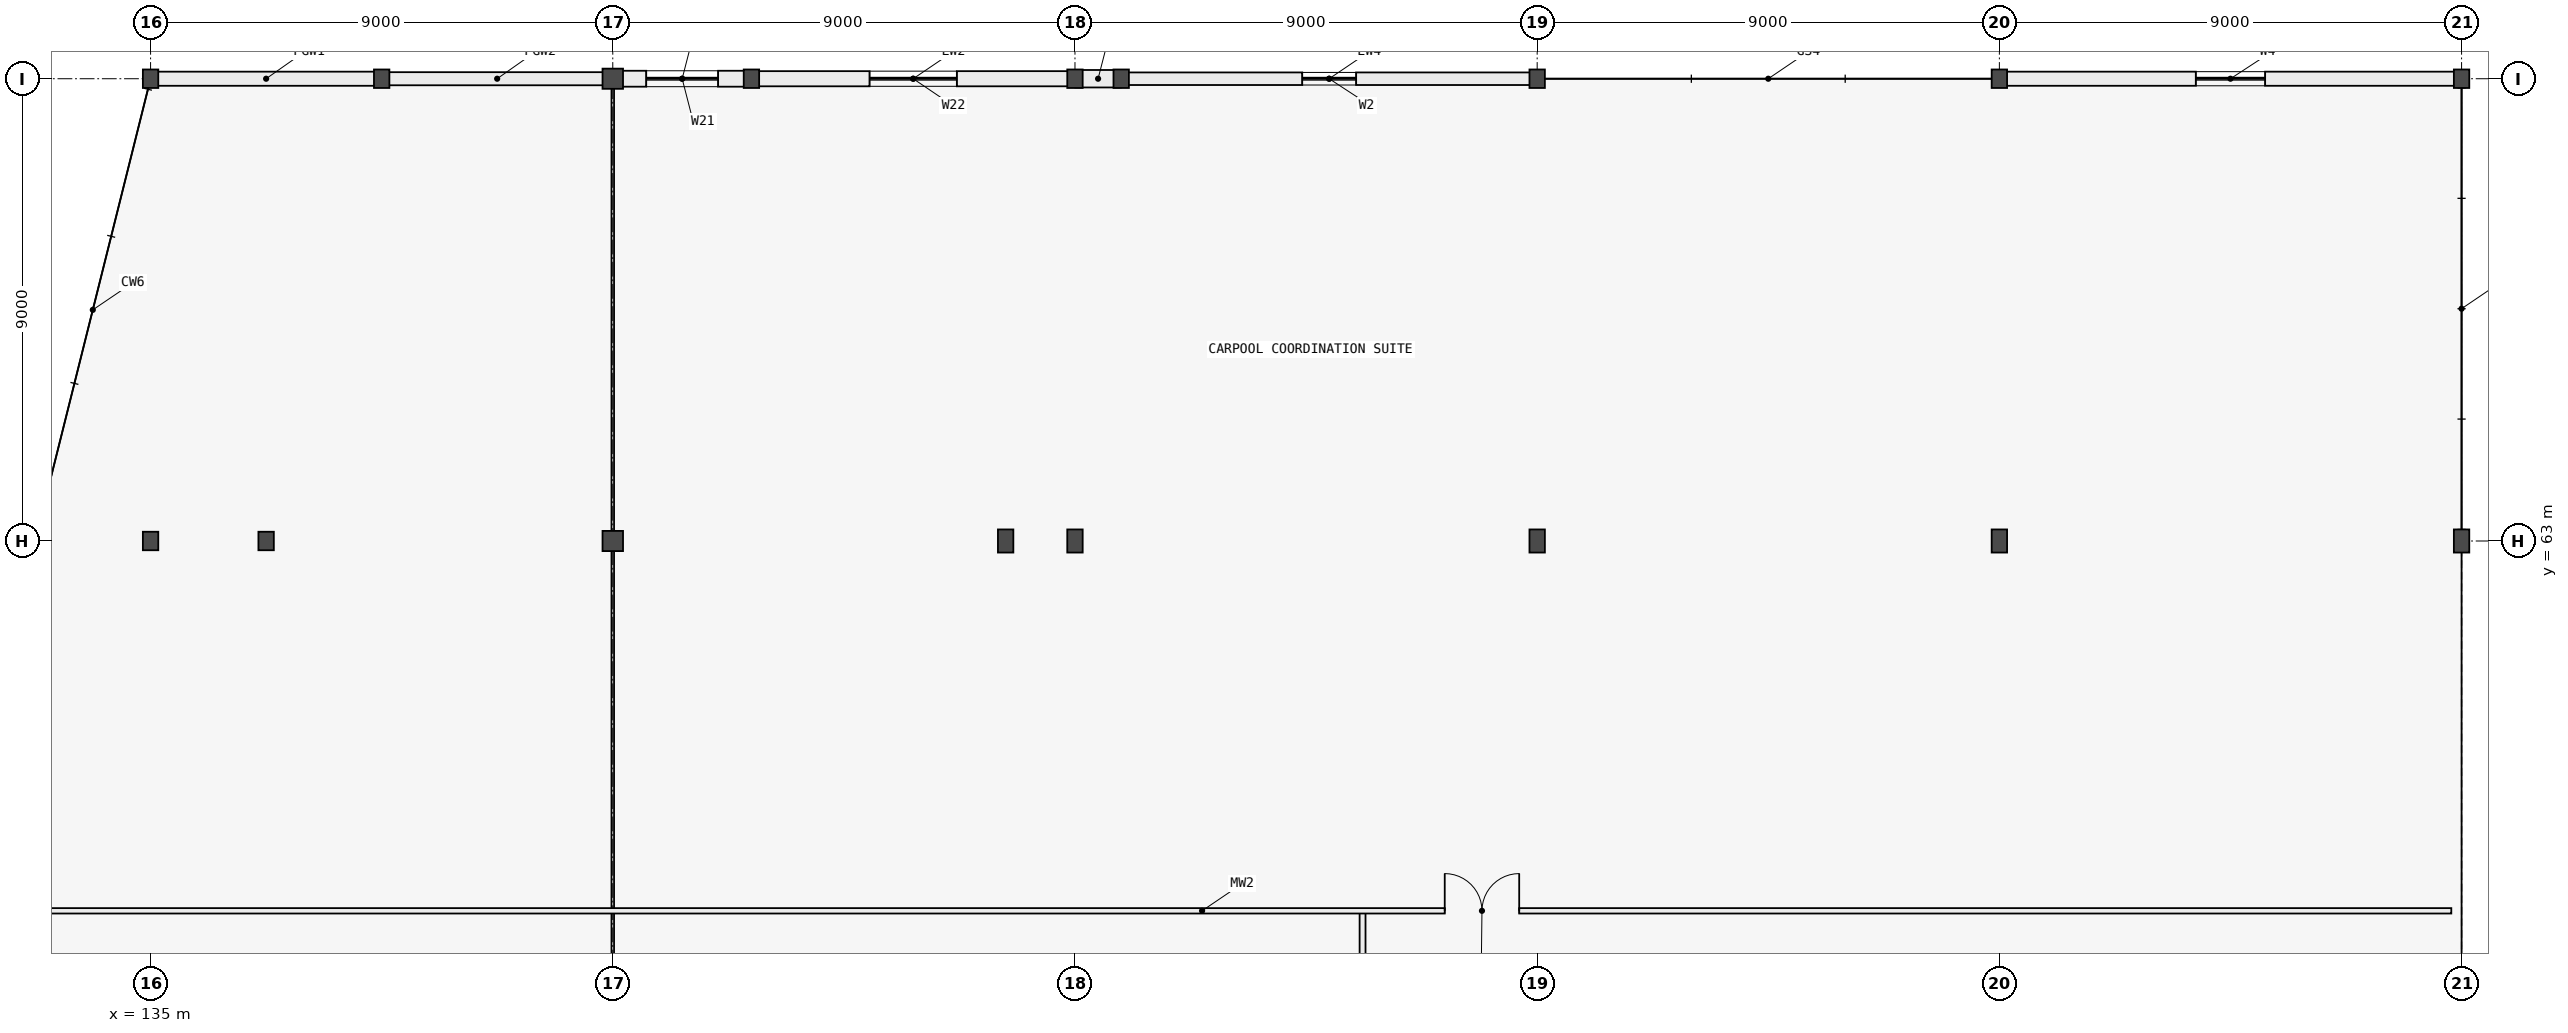
"""IFC4 building model, lengths in metres.
Left out: names, types, materials, properties, quantities, classifications, styles, units other than length and angle.
Written with IfcOpenShell. Run it as: python <this file> out.ifc"""

import sys

from ifc_helpers import new_model, si_unit, direction, frame, frame_2d, origin, origin_2d, place, context, subcontext, project, spatial, rectangle, i_section, extrude, element, fill, save


model = new_model("IFC4")
c1 = context("Model", 3, precision=1e-05, world=origin(), true_north=direction((0.0, 1.0)))
c2 = subcontext(c1, "Body", "Model", "MODEL_VIEW")
j1 = project(units=[si_unit("LENGTHUNIT", "METRE"), si_unit("PLANEANGLEUNIT", "RADIAN")], contexts=[c1])
p1 = place(None, origin())
s1 = spatial("IfcSite", under=j1, at=p1, CompositionType="ELEMENT")
p2 = place(p1, origin())
s2 = spatial("IfcBuilding", under=s1, at=p2, CompositionType="ELEMENT")
p3 = place(p2, frame((0.0, 0.0, 4.2)))
s3 = spatial("IfcBuildingStorey", under=s2, at=p3, CompositionType="ELEMENT", Elevation=4.2)
for number, where, z_axis, x_axis in (
    (1, (135.0, 63.0, 0.0), (0.0, 0.0, 1.0), (1.0, 0.0, 0.0)),
    (2, (137.25, 63.0, 0.0), (0.0, 0.0, 1.0), (1.0, 0.0, 0.0)),
):
    element("IfcColumn", number, at=place(p3, frame(where, z_axis=z_axis, x_axis=x_axis)), inside=s3, PredefinedType="COLUMN", context=c2, shape_type="SweptSolid", body=[
        extrude(i_section(OverallWidth=0.3, OverallDepth=0.36, WebThickness=0.012, FlangeThickness=0.022, FilletRadius=0.027, at=origin_2d()), origin(), (0.0, 0.0, 1.0), 4.2),
    ])
p4 = place(p3, frame((144.0, 63.0, 0.0), z_axis=(0.0, 0.0, 1.0), x_axis=(1.0, 0.0, 0.0)))
e3 = element("IfcColumn", 3, at=p4, inside=s3, PredefinedType="COLUMN", context=c2, shape_type="SweptSolid", body=[
    extrude(i_section(OverallWidth=0.399, OverallDepth=0.393, WebThickness=0.018, FlangeThickness=0.028, FilletRadius=0.015, at=origin_2d()), origin(), (0.0, 0.0, 1.0), 4.2),
])
for number, where, z_axis, x_axis in (
    (4, (151.65, 63.0, 0.0), (0.0, 0.0, 1.0), (1.0, 0.0, 0.0)),
    (5, (153.0, 63.0, 0.0), (0.0, 0.0, 1.0), (1.0, 0.0, 0.0)),
    (6, (162.0, 63.0, 0.0), (0.0, 0.0, 1.0), (1.0, 0.0, 0.0)),
    (7, (171.0, 63.0, 0.0), (0.0, 0.0, 1.0), (1.0, 0.0, 0.0)),
    (8, (180.0, 63.0, 0.0), (0.0, 0.0, 1.0), (1.0, 0.0, 0.0)),
):
    element("IfcColumn", number, at=place(p3, frame(where, z_axis=z_axis, x_axis=x_axis)), inside=s3, PredefinedType="COLUMN", context=c2, shape_type="SweptSolid", body=[
        extrude(i_section(OverallWidth=0.3, OverallDepth=0.45, WebThickness=0.014, FlangeThickness=0.026, FilletRadius=0.027, at=origin_2d()), origin(), (0.0, 0.0, 1.0), 4.2),
    ])
for number, where, z_axis, x_axis in (
    (9, (135.0, 72.0, 0.0), (0.0, 0.0, 1.0), (1.0, 0.0, 0.0)),
    (10, (139.5, 72.0, 0.0), (0.0, 0.0, 1.0), (1.0, 0.0, 0.0)),
):
    element("IfcColumn", number, at=place(p3, frame(where, z_axis=z_axis, x_axis=x_axis)), inside=s3, PredefinedType="COLUMN", context=c2, shape_type="SweptSolid", body=[
        extrude(i_section(OverallWidth=0.3, OverallDepth=0.36, WebThickness=0.012, FlangeThickness=0.022, FilletRadius=0.027, at=origin_2d()), origin(), (0.0, 0.0, 1.0), 4.2),
    ])
p5 = place(p3, frame((144.0, 72.0, 0.0), z_axis=(0.0, 0.0, 1.0), x_axis=(1.0, 0.0, 0.0)))
e11 = element("IfcColumn", 11, at=p5, inside=s3, PredefinedType="COLUMN", context=c2, shape_type="SweptSolid", body=[
    extrude(i_section(OverallWidth=0.399, OverallDepth=0.393, WebThickness=0.018, FlangeThickness=0.028, FilletRadius=0.015, at=origin_2d()), origin(), (0.0, 0.0, 1.0), 4.2),
])
for number, where, z_axis, x_axis in (
    (12, (146.7, 72.0, 0.0), (0.0, 0.0, 1.0), (1.0, 0.0, 0.0)),
    (13, (153.0, 72.0, 0.0), (0.0, 0.0, 1.0), (1.0, 0.0, 0.0)),
    (14, (153.9, 72.0, 0.0), (0.0, 0.0, 1.0), (1.0, 0.0, 0.0)),
    (15, (162.0, 72.0, 0.0), (0.0, 0.0, 1.0), (1.0, 0.0, 0.0)),
    (16, (171.0, 72.0, 0.0), (0.0, 0.0, 1.0), (1.0, 0.0, 0.0)),
    (17, (180.0, 72.0, 0.0), (0.0, 0.0, 1.0), (1.0, 0.0, 0.0)),
):
    element("IfcColumn", number, at=place(p3, frame(where, z_axis=z_axis, x_axis=x_axis)), inside=s3, PredefinedType="COLUMN", context=c2, shape_type="SweptSolid", body=[
        extrude(i_section(OverallWidth=0.3, OverallDepth=0.36, WebThickness=0.012, FlangeThickness=0.022, FilletRadius=0.027, at=origin_2d()), origin(), (0.0, 0.0, 1.0), 4.2),
    ])
p6 = place(p3, frame((135.006, 72.0, 0.0), z_axis=(0.0, 0.0, 1.0), x_axis=(1.0, 0.0, 0.0)))
e18 = element("IfcWall", 18, at=p6, inside=s3, PredefinedType="POLYGONAL", context=c2, shape_type="SweptSolid", body=[
    extrude(rectangle(XDim=4.488, YDim=0.275, at=frame_2d((2.244, 0.0))), origin(), (0.0, 0.0, 1.0), 3.65),
])
p7 = place(p3, frame((139.506, 72.0, 0.0), z_axis=(0.0, 0.0, 1.0), x_axis=(1.0, 0.0, 0.0)))
e19 = element("IfcWall", 19, at=p7, inside=s3, PredefinedType="POLYGONAL", context=c2, shape_type="SweptSolid", body=[
    extrude(rectangle(XDim=4.485, YDim=0.255, at=frame_2d((2.243, 0.0))), origin(), (0.0, 0.0, 1.0), 3.65),
])
p8 = place(p3, frame((144.009, 72.0, 0.0), z_axis=(0.0, 0.0, 1.0), x_axis=(1.0, 0.0, 0.0)))
e20 = element("IfcWall", 20, at=p8, inside=s3, PredefinedType="STANDARD", context=c2, shape_type="SweptSolid", body=[
    extrude(rectangle(XDim=2.685, YDim=0.31, at=frame_2d((1.342, 0.0))), origin(), (0.0, 0.0, 1.0), 3.65),
])
p9 = place(p8, frame((0.643, 0.0, 0.95)))
e21 = element("IfcOpeningElement", 21, at=p9, cuts=e20, PredefinedType="OPENING", context=c2, shape_type="SweptSolid", body=[
    extrude(rectangle(XDim=1.4, YDim=2.0, at=frame_2d((0.7, 1.0))), frame((0.0, 0.165, 0.0), z_axis=(0.0, -1.0, 0.0), x_axis=(1.0, 0.0, 0.0)), (0.0, 0.0, 1.0), 0.33),
])
p10 = place(p3, frame((146.706, 72.0, 0.0), z_axis=(0.0, 0.0, 1.0), x_axis=(1.0, 0.0, 0.0)))
e22 = element("IfcWall", 22, at=p10, inside=s3, PredefinedType="STANDARD", context=c2, shape_type="SweptSolid", body=[
    extrude(rectangle(XDim=6.288, YDim=0.295, at=frame_2d((3.144, 0.0))), origin(), (0.0, 0.0, 1.0), 3.65),
])
p11 = place(p10, frame((2.294, 0.0, 0.95)))
e23 = element("IfcOpeningElement", 23, at=p11, cuts=e22, PredefinedType="OPENING", context=c2, shape_type="SweptSolid", body=[
    extrude(rectangle(XDim=1.7, YDim=2.1, at=frame_2d((0.85, 1.05))), frame((0.0, 0.157, 0.0), z_axis=(0.0, -1.0, 0.0), x_axis=(1.0, 0.0, 0.0)), (0.0, 0.0, 1.0), 0.315),
])
p12 = place(p3, frame((153.006, 72.0, 0.0), z_axis=(0.0, 0.0, 1.0), x_axis=(1.0, 0.0, 0.0)))
e24 = element("IfcWall", 24, at=p12, inside=s3, PredefinedType="STANDARD", context=c2, shape_type="SweptSolid", body=[
    extrude(rectangle(XDim=0.888, YDim=0.34, at=frame_2d((0.444, 0.0))), origin(), (0.0, 0.0, 1.0), 3.65),
])
p13 = place(p3, frame((153.906, 72.0, 0.0), z_axis=(0.0, 0.0, 1.0), x_axis=(1.0, 0.0, 0.0)))
e25 = element("IfcWall", 25, at=p13, inside=s3, PredefinedType="STANDARD", context=c2, shape_type="SweptSolid", body=[
    extrude(rectangle(XDim=8.088, YDim=0.245, at=frame_2d((4.044, 0.0))), origin(), (0.0, 0.0, 1.0), 3.62),
])
p14 = place(p13, frame((3.519, 0.0, 0.95)))
e26 = element("IfcOpeningElement", 26, at=p14, cuts=e25, PredefinedType="OPENING", context=c2, shape_type="SweptSolid", body=[
    extrude(rectangle(XDim=1.05, YDim=1.25, at=frame_2d((0.525, 0.625))), frame((0.0, 0.133, 0.0), z_axis=(0.0, -1.0, 0.0), x_axis=(1.0, 0.0, 0.0)), (0.0, 0.0, 1.0), 0.265),
])
p15 = place(p3, frame((171.006, 72.0, 0.0), z_axis=(0.0, 0.0, 1.0), x_axis=(1.0, 0.0, 0.0)))
e27 = element("IfcWall", 27, at=p15, inside=s3, PredefinedType="POLYGONAL", context=c2, shape_type="SweptSolid", body=[
    extrude(rectangle(XDim=8.988, YDim=0.275, at=frame_2d((4.494, 0.0))), origin(), (0.0, 0.0, 1.0), 3.62),
])
p16 = place(p15, frame((3.819, 0.0, 0.95)))
e28 = element("IfcOpeningElement", 28, at=p16, cuts=e27, PredefinedType="OPENING", context=c2, shape_type="SweptSolid", body=[
    extrude(rectangle(XDim=1.35, YDim=1.4, at=frame_2d((0.675, 0.7))), frame((0.0, 0.147, 0.0), z_axis=(0.0, -1.0, 0.0), x_axis=(1.0, 0.0, 0.0)), (0.0, 0.0, 1.0), 0.295),
])
p17 = place(p3, frame((158.6, 36.2, 0.0), z_axis=(0.0, 0.0, 1.0), x_axis=(0.0, 1.0, 0.0)))
e29 = element("IfcWall", 29, at=p17, inside=s3, PredefinedType="MOVABLE", context=c2, shape_type="SweptSolid", body=[
    extrude(rectangle(XDim=19.6, YDim=0.115, at=frame_2d((9.8, 0.0))), origin(), (0.0, 0.0, 1.0), 3.65),
])
p18 = place(p17, frame((9.2, 0.0, 0.0)))
e30 = element("IfcOpeningElement", 30, at=p18, cuts=e29, PredefinedType="OPENING", context=c2, shape_type="SweptSolid", body=[
    extrude(rectangle(XDim=1.32, YDim=2.2, at=frame_2d((0.66, 1.1))), frame((0.0, 0.067, 0.0), z_axis=(0.0, -1.0, 0.0), x_axis=(1.0, 0.0, 0.0)), (0.0, 0.0, 1.0), 0.135),
])
p19 = place(p3, frame((131.15, 55.8, 0.0), z_axis=(0.0, 0.0, 1.0), x_axis=(1.0, 0.0, 0.0)))
e31 = element("IfcWall", 31, at=p19, inside=s3, PredefinedType="MOVABLE", context=c2, shape_type="SweptSolid", body=[
    extrude(rectangle(XDim=48.65, YDim=0.105, at=frame_2d((24.325, 0.0))), origin(), (0.0, 0.0, 1.0), 3.945),
])
p20 = place(p19, frame((29.05, 0.0, 0.0)))
e32 = element("IfcOpeningElement", 32, at=p20, cuts=e31, PredefinedType="OPENING", context=c2, shape_type="SweptSolid", body=[
    extrude(rectangle(XDim=1.45, YDim=2.22, at=frame_2d((0.725, 1.11))), frame((0.0, 0.062, 0.0), z_axis=(0.0, -1.0, 0.0), x_axis=(1.0, 0.0, 0.0)), (0.0, 0.0, 1.0), 0.125),
])
p21 = place(p9, origin())
e33 = element("IfcWindow", 33, at=p21, inside=s3, PartitioningType="SINGLE_PANEL", PredefinedType="WINDOW", context=c2, shape_type="SweptSolid", body=[
    extrude(rectangle(XDim=1.4, YDim=2.0, at=frame_2d((0.7, 1.0))), frame((0.0, 0.03, 0.0), z_axis=(0.0, -1.0, 0.0), x_axis=(1.0, 0.0, 0.0)), (0.0, 0.0, 1.0), 0.06),
])
fill(e21, e33)
p22 = place(p11, origin())
e34 = element("IfcWindow", 34, at=p22, inside=s3, PartitioningType="SINGLE_PANEL", PredefinedType="WINDOW", context=c2, shape_type="SweptSolid", body=[
    extrude(rectangle(XDim=1.7, YDim=2.1, at=frame_2d((0.85, 1.05))), frame((0.0, 0.03, 0.0), z_axis=(0.0, -1.0, 0.0), x_axis=(1.0, 0.0, 0.0)), (0.0, 0.0, 1.0), 0.06),
])
fill(e23, e34)
p23 = place(p14, origin())
e35 = element("IfcWindow", 35, at=p23, inside=s3, PartitioningType="SINGLE_PANEL", PredefinedType="WINDOW", context=c2, shape_type="SweptSolid", body=[
    extrude(rectangle(XDim=1.05, YDim=1.25, at=frame_2d((0.525, 0.625))), frame((0.0, 0.03, 0.0), z_axis=(0.0, -1.0, 0.0), x_axis=(1.0, 0.0, 0.0)), (0.0, 0.0, 1.0), 0.06),
])
fill(e26, e35)
p24 = place(p16, origin())
e36 = element("IfcWindow", 36, at=p24, inside=s3, PartitioningType="SINGLE_PANEL", PredefinedType="WINDOW", context=c2, shape_type="SweptSolid", body=[
    extrude(rectangle(XDim=1.35, YDim=1.4, at=frame_2d((0.675, 0.7))), frame((0.0, 0.03, 0.0), z_axis=(0.0, -1.0, 0.0), x_axis=(1.0, 0.0, 0.0)), (0.0, 0.0, 1.0), 0.06),
])
fill(e28, e36)
p25 = place(p20, origin())
e37 = element("IfcDoor", 37, at=p25, inside=s3, OperationType="DOUBLE_DOOR_SINGLE_SWING", PredefinedType="DOOR", context=c2, shape_type="SweptSolid", body=[
    extrude(rectangle(XDim=1.45, YDim=2.22, at=frame_2d((0.725, 1.11))), frame((0.0, 0.025, 0.0), z_axis=(0.0, -1.0, 0.0), x_axis=(1.0, 0.0, 0.0)), (0.0, 0.0, 1.0), 0.05),
])
fill(e32, e37)
save(model, sys.argv[1])
